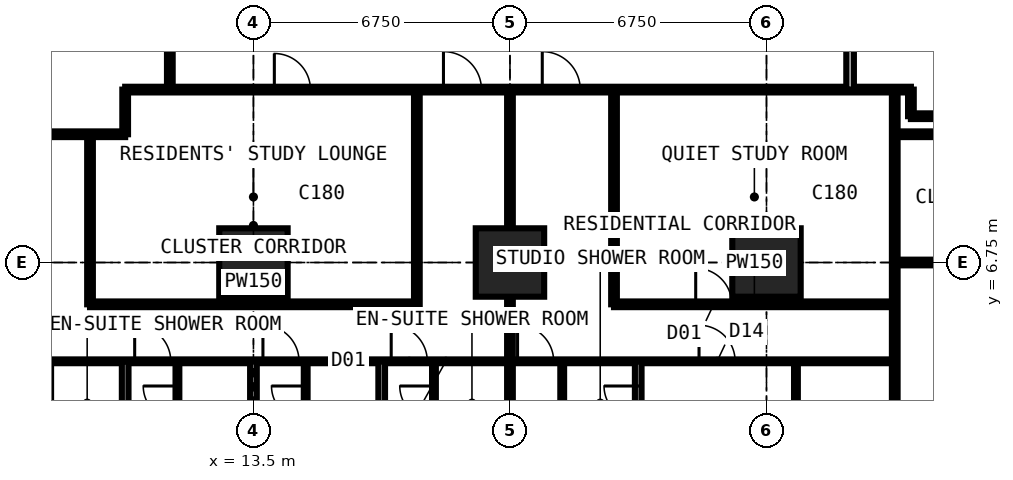
"""IFC4 building model, lengths in metres.
Left out: names, types, materials, properties, quantities, classifications, styles, units other than length and angle.
Written with IfcOpenShell. Run it as: python <this file> out.ifc"""

import sys

from ifc_helpers import new_model, si_unit, direction, frame, frame_2d, origin, origin_2d, place, context, subcontext, project, spatial, rectangle, extrude, element, fill, save


model = new_model("IFC4")
c1 = context("Model", 3, precision=1e-05, world=origin(), true_north=direction((0.0, 1.0)))
c2 = subcontext(c1, "Body", "Model", "MODEL_VIEW")
j1 = project(units=[si_unit("LENGTHUNIT", "METRE"), si_unit("PLANEANGLEUNIT", "RADIAN")], contexts=[c1])
p1 = place(None, origin())
s1 = spatial("IfcSite", under=j1, at=p1, CompositionType="ELEMENT")
p2 = place(p1, origin())
s2 = spatial("IfcBuilding", under=s1, at=p2, CompositionType="ELEMENT")
p3 = place(p2, frame((0.0, 0.0, 68.4)))
s3 = spatial("IfcBuildingStorey", under=s2, at=p3, CompositionType="ELEMENT", Elevation=68.4)
for number, where, z_axis, x_axis in (
    (1, (13.5, 6.75, 0.0), (0.0, 0.0, 1.0), (1.0, 0.0, 0.0)),
    (2, (20.25, 6.75, 0.0), (0.0, 0.0, 1.0), (1.0, 0.0, 0.0)),
    (3, (27.0, 6.75, 0.0), (0.0, 0.0, 1.0), (1.0, 0.0, 0.0)),
):
    element("IfcColumn", number, at=place(p3, frame(where, z_axis=z_axis, x_axis=x_axis)), inside=s3, PredefinedType="COLUMN", context=c2, shape_type="SweptSolid", body=[
        extrude(rectangle(XDim=1.8, YDim=1.8, at=origin_2d()), origin(), (0.0, 0.0, 1.0), 3.6),
    ])
p4 = place(p3, frame((-0.734, 10.125, 0.0), z_axis=(0.0, 0.0, 1.0), x_axis=(1.0, 0.0, 0.0)))
e4 = element("IfcWall", 4, at=p4, inside=s3, PredefinedType="PARTITIONING", context=c2, shape_type="SweptSolid", body=[
    extrude(rectangle(XDim=10.859, YDim=0.15, at=frame_2d((5.429, 0.0))), origin(), (0.0, 0.0, 1.0), 3.375),
])
p5 = place(p4, frame((5.134, 0.0, 0.0)))
e5 = element("IfcOpeningElement", 5, at=p5, cuts=e4, PredefinedType="OPENING", context=c2, shape_type="SweptSolid", body=[
    extrude(rectangle(XDim=1.0, YDim=2.2, at=frame_2d((0.5, 1.1))), frame((0.0, 0.085, 0.0), z_axis=(0.0, -1.0, 0.0), x_axis=(1.0, 0.0, 0.0)), (0.0, 0.0, 1.0), 0.17),
])
p6 = place(p3, frame((6.75, 4.15, 0.0), z_axis=(0.0, 0.0, 1.0), x_axis=(1.0, 0.0, 0.0)))
e6 = element("IfcWall", 6, at=p6, inside=s3, PredefinedType="PARTITIONING", context=c2, shape_type="SweptSolid", body=[
    extrude(rectangle(XDim=23.625, YDim=0.1, at=frame_2d((11.812, 0.0))), origin(), (0.0, 0.0, 1.0), 3.375),
])
p7 = place(p6, frame((0.2, 0.0, 0.0)))
e7 = element("IfcOpeningElement", 7, at=p7, cuts=e6, PredefinedType="OPENING", context=c2, shape_type="SweptSolid", body=[
    extrude(rectangle(XDim=0.95, YDim=2.2, at=frame_2d((0.475, 1.1))), frame((0.0, 0.06, 0.0), z_axis=(0.0, -1.0, 0.0), x_axis=(1.0, 0.0, 0.0)), (0.0, 0.0, 1.0), 0.12),
])
p8 = place(p6, frame((3.625, 0.0, 0.0)))
e8 = element("IfcOpeningElement", 8, at=p8, cuts=e6, PredefinedType="OPENING", context=c2, shape_type="SweptSolid", body=[
    extrude(rectangle(XDim=0.95, YDim=2.2, at=frame_2d((0.475, 1.1))), frame((0.0, 0.06, 0.0), z_axis=(0.0, -1.0, 0.0), x_axis=(1.0, 0.0, 0.0)), (0.0, 0.0, 1.0), 0.12),
])
p9 = place(p6, frame((7.0, 0.0, 0.0)))
e9 = element("IfcOpeningElement", 9, at=p9, cuts=e6, PredefinedType="OPENING", context=c2, shape_type="SweptSolid", body=[
    extrude(rectangle(XDim=0.95, YDim=2.2, at=frame_2d((0.475, 1.1))), frame((0.0, 0.06, 0.0), z_axis=(0.0, -1.0, 0.0), x_axis=(1.0, 0.0, 0.0)), (0.0, 0.0, 1.0), 0.12),
])
p10 = place(p6, frame((10.375, 0.0, 0.0)))
e10 = element("IfcOpeningElement", 10, at=p10, cuts=e6, PredefinedType="OPENING", context=c2, shape_type="SweptSolid", body=[
    extrude(rectangle(XDim=0.95, YDim=2.2, at=frame_2d((0.475, 1.1))), frame((0.0, 0.06, 0.0), z_axis=(0.0, -1.0, 0.0), x_axis=(1.0, 0.0, 0.0)), (0.0, 0.0, 1.0), 0.12),
])
p11 = place(p6, frame((18.475, 0.0, 0.0)))
e11 = element("IfcOpeningElement", 11, at=p11, cuts=e6, PredefinedType="OPENING", context=c2, shape_type="SweptSolid", body=[
    extrude(rectangle(XDim=0.95, YDim=2.2, at=frame_2d((0.475, 1.1))), frame((0.0, 0.06, 0.0), z_axis=(0.0, -1.0, 0.0), x_axis=(1.0, 0.0, 0.0)), (0.0, 0.0, 1.0), 0.12),
])
p12 = place(p6, frame((13.7, 0.0, 0.0)))
e12 = element("IfcOpeningElement", 12, at=p12, cuts=e6, PredefinedType="OPENING", context=c2, shape_type="SweptSolid", body=[
    extrude(rectangle(XDim=0.95, YDim=2.2, at=frame_2d((0.475, 1.1))), frame((0.0, 0.06, 0.0), z_axis=(0.0, -1.0, 0.0), x_axis=(1.0, 0.0, 0.0)), (0.0, 0.0, 1.0), 0.12),
])
p13 = place(p3, frame((9.2, 5.65, 0.0), z_axis=(0.0, 0.0, 1.0), x_axis=(0.0, 1.0, 0.0)))
e13 = element("IfcWall", 13, at=p13, inside=s3, PredefinedType="PARTITIONING", context=c2, shape_type="SweptSolid", body=[
    extrude(rectangle(XDim=4.475, YDim=0.15, at=frame_2d((2.238, 0.0))), origin(), (0.0, 0.0, 1.0), 3.375),
])
p14 = place(p3, frame((9.2, 5.65, 0.0), z_axis=(0.0, 0.0, 1.0), x_axis=(1.0, 0.0, 0.0)))
e14 = element("IfcWall", 14, at=p14, inside=s3, PredefinedType="PARTITIONING", context=c2, shape_type="SweptSolid", body=[
    extrude(rectangle(XDim=8.6, YDim=0.15, at=frame_2d((4.3, 0.0))), origin(), (0.0, 0.0, 1.0), 3.375),
])
p15 = place(p3, frame((10.125, -0.734, 0.0), z_axis=(0.0, 0.0, 1.0), x_axis=(0.0, 1.0, 0.0)))
e15 = element("IfcWall", 15, at=p15, inside=s3, PredefinedType="PARTITIONING", context=c2, shape_type="SweptSolid", body=[
    extrude(rectangle(XDim=4.884, YDim=0.175, at=frame_2d((2.442, 0.0))), origin(), (0.0, 0.0, 1.0), 3.375),
])
p16 = place(p3, frame((10.125, 10.125, 0.0), z_axis=(0.0, 0.0, 1.0), x_axis=(0.0, 1.0, 0.0)))
e16 = element("IfcWall", 16, at=p16, inside=s3, PredefinedType="PARTITIONING", context=c2, shape_type="SweptSolid", body=[
    extrude(rectangle(XDim=1.175, YDim=0.15, at=frame_2d((0.587, 0.0))), origin(), (0.0, 0.0, 1.0), 3.375),
])
p17 = place(p3, frame((10.125, 11.3, 0.0), z_axis=(0.0, 0.0, 1.0), x_axis=(1.0, 0.0, 0.0)))
e17 = element("IfcWall", 17, at=p17, inside=s3, PredefinedType="PARTITIONING", context=c2, shape_type="SweptSolid", body=[
    extrude(rectangle(XDim=20.675, YDim=0.15, at=frame_2d((10.337, 0.0))), origin(), (0.0, 0.0, 1.0), 3.375),
])
p18 = place(p17, frame((8.375, 0.0, 0.0)))
e18 = element("IfcOpeningElement", 18, at=p18, cuts=e17, PredefinedType="OPENING", context=c2, shape_type="SweptSolid", body=[
    extrude(rectangle(XDim=1.0, YDim=2.2, at=frame_2d((0.5, 1.1))), frame((0.0, 0.085, 0.0), z_axis=(0.0, -1.0, 0.0), x_axis=(1.0, 0.0, 0.0)), (0.0, 0.0, 1.0), 0.17),
])
p19 = place(p17, frame((10.975, 0.0, 0.0)))
e19 = element("IfcOpeningElement", 19, at=p19, cuts=e17, PredefinedType="OPENING", context=c2, shape_type="SweptSolid", body=[
    extrude(rectangle(XDim=1.0, YDim=2.2, at=frame_2d((0.5, 1.1))), frame((0.0, 0.085, 0.0), z_axis=(0.0, -1.0, 0.0), x_axis=(1.0, 0.0, 0.0)), (0.0, 0.0, 1.0), 0.17),
])
p20 = place(p17, frame((3.925, 0.0, 0.0)))
e20 = element("IfcOpeningElement", 20, at=p20, cuts=e17, PredefinedType="OPENING", context=c2, shape_type="SweptSolid", body=[
    extrude(rectangle(XDim=0.95, YDim=2.2, at=frame_2d((0.475, 1.1))), frame((0.0, 0.085, 0.0), z_axis=(0.0, -1.0, 0.0), x_axis=(1.0, 0.0, 0.0)), (0.0, 0.0, 1.0), 0.17),
])
p21 = place(p3, frame((11.3, 11.3, 0.0), z_axis=(0.0, 0.0, 1.0), x_axis=(0.0, 1.0, 0.0)))
e21 = element("IfcWall", 21, at=p21, inside=s3, PredefinedType="PARTITIONING", context=c2, shape_type="SweptSolid", body=[
    extrude(rectangle(XDim=19.075, YDim=0.15, at=frame_2d((9.538, 0.0))), origin(), (0.0, 0.0, 1.0), 3.375),
])
p22 = place(p21, frame((12.875, 0.0, 0.0)))
e22 = element("IfcOpeningElement", 22, at=p22, cuts=e21, PredefinedType="OPENING", context=c2, shape_type="SweptSolid", body=[
    extrude(rectangle(XDim=1.0, YDim=2.2, at=frame_2d((0.5, 1.1))), frame((0.0, 0.085, 0.0), z_axis=(0.0, -1.0, 0.0), x_axis=(1.0, 0.0, 0.0)), (0.0, 0.0, 1.0), 0.17),
])
p23 = place(p21, frame((10.438, 0.0, 0.0)))
e23 = element("IfcOpeningElement", 23, at=p23, cuts=e21, PredefinedType="OPENING", context=c2, shape_type="SweptSolid", body=[
    extrude(rectangle(XDim=1.0, YDim=2.2, at=frame_2d((0.5, 1.1))), frame((0.0, 0.085, 0.0), z_axis=(0.0, -1.0, 0.0), x_axis=(1.0, 0.0, 0.0)), (0.0, 0.0, 1.0), 0.17),
])
p24 = place(p21, frame((15.675, 0.0, 0.0)))
e24 = element("IfcOpeningElement", 24, at=p24, cuts=e21, PredefinedType="OPENING", context=c2, shape_type="SweptSolid", body=[
    extrude(rectangle(XDim=0.95, YDim=2.2, at=frame_2d((0.475, 1.1))), frame((0.0, 0.085, 0.0), z_axis=(0.0, -1.0, 0.0), x_axis=(1.0, 0.0, 0.0)), (0.0, 0.0, 1.0), 0.17),
])
p25 = place(p3, frame((11.5, 1.95, 0.0), z_axis=(0.0, 0.0, 1.0), x_axis=(0.0, 1.0, 0.0)))
e25 = element("IfcWall", 25, at=p25, inside=s3, PredefinedType="PARTITIONING", context=c2, shape_type="SweptSolid", body=[
    extrude(rectangle(XDim=2.2, YDim=0.1, at=frame_2d((1.1, 0.0))), origin(), (0.0, 0.0, 1.0), 3.375),
])
p26 = place(p25, frame((0.65, 0.0, 0.0)))
e26 = element("IfcOpeningElement", 26, at=p26, cuts=e25, PredefinedType="OPENING", context=c2, shape_type="SweptSolid", body=[
    extrude(rectangle(XDim=0.9, YDim=2.2, at=frame_2d((0.45, 1.1))), frame((0.0, 0.06, 0.0), z_axis=(0.0, -1.0, 0.0), x_axis=(1.0, 0.0, 0.0)), (0.0, 0.0, 1.0), 0.12),
])
p27 = place(p3, frame((13.5, -0.734, 0.0), z_axis=(0.0, 0.0, 1.0), x_axis=(0.0, 1.0, 0.0)))
e27 = element("IfcWall", 27, at=p27, inside=s3, PredefinedType="PARTITIONING", context=c2, shape_type="SweptSolid", body=[
    extrude(rectangle(XDim=4.884, YDim=0.175, at=frame_2d((2.442, 0.0))), origin(), (0.0, 0.0, 1.0), 2.877),
])
p28 = place(p3, frame((14.875, 1.95, 0.0), z_axis=(0.0, 0.0, 1.0), x_axis=(0.0, 1.0, 0.0)))
e28 = element("IfcWall", 28, at=p28, inside=s3, PredefinedType="PARTITIONING", context=c2, shape_type="SweptSolid", body=[
    extrude(rectangle(XDim=2.2, YDim=0.1, at=frame_2d((1.1, 0.0))), origin(), (0.0, 0.0, 1.0), 3.375),
])
p29 = place(p28, frame((0.65, 0.0, 0.0)))
e29 = element("IfcOpeningElement", 29, at=p29, cuts=e28, PredefinedType="OPENING", context=c2, shape_type="SweptSolid", body=[
    extrude(rectangle(XDim=0.9, YDim=2.2, at=frame_2d((0.45, 1.1))), frame((0.0, 0.06, 0.0), z_axis=(0.0, -1.0, 0.0), x_axis=(1.0, 0.0, 0.0)), (0.0, 0.0, 1.0), 0.12),
])
p30 = place(p3, frame((16.875, -0.734, 0.0), z_axis=(0.0, 0.0, 1.0), x_axis=(0.0, 1.0, 0.0)))
e30 = element("IfcWall", 30, at=p30, inside=s3, PredefinedType="PARTITIONING", context=c2, shape_type="SweptSolid", body=[
    extrude(rectangle(XDim=4.884, YDim=0.175, at=frame_2d((2.442, 0.0))), origin(), (0.0, 0.0, 1.0), 3.375),
])
p31 = place(p3, frame((17.8, 5.65, 0.0), z_axis=(0.0, 0.0, 1.0), x_axis=(0.0, 1.0, 0.0)))
e31 = element("IfcWall", 31, at=p31, inside=s3, PredefinedType="PARTITIONING", context=c2, shape_type="SweptSolid", body=[
    extrude(rectangle(XDim=5.65, YDim=0.15, at=frame_2d((2.825, 0.0))), origin(), (0.0, 0.0, 1.0), 3.375),
])
p32 = place(p3, frame((18.25, 1.95, 0.0), z_axis=(0.0, 0.0, 1.0), x_axis=(0.0, 1.0, 0.0)))
e32 = element("IfcWall", 32, at=p32, inside=s3, PredefinedType="PARTITIONING", context=c2, shape_type="SweptSolid", body=[
    extrude(rectangle(XDim=2.2, YDim=0.1, at=frame_2d((1.1, 0.0))), origin(), (0.0, 0.0, 1.0), 3.375),
])
p33 = place(p32, frame((0.65, 0.0, 0.0)))
e33 = element("IfcOpeningElement", 33, at=p33, cuts=e32, PredefinedType="OPENING", context=c2, shape_type="SweptSolid", body=[
    extrude(rectangle(XDim=0.9, YDim=2.2, at=frame_2d((0.45, 1.1))), frame((0.0, 0.06, 0.0), z_axis=(0.0, -1.0, 0.0), x_axis=(1.0, 0.0, 0.0)), (0.0, 0.0, 1.0), 0.12),
])
p34 = place(p3, frame((20.25, -0.734, 0.0), z_axis=(0.0, 0.0, 1.0), x_axis=(0.0, 1.0, 0.0)))
e34 = element("IfcWall", 34, at=p34, inside=s3, PredefinedType="PARTITIONING", context=c2, shape_type="SweptSolid", body=[
    extrude(rectangle(XDim=12.034, YDim=0.15, at=frame_2d((6.017, 0.0))), origin(), (0.0, 0.0, 1.0), 2.61),
])
p35 = place(p3, frame((21.625, 1.95, 0.0), z_axis=(0.0, 0.0, 1.0), x_axis=(0.0, 1.0, 0.0)))
e35 = element("IfcWall", 35, at=p35, inside=s3, PredefinedType="PARTITIONING", context=c2, shape_type="SweptSolid", body=[
    extrude(rectangle(XDim=2.2, YDim=0.1, at=frame_2d((1.1, 0.0))), origin(), (0.0, 0.0, 1.0), 3.375),
])
p36 = place(p3, frame((22.988, 5.65, 0.0), z_axis=(0.0, 0.0, 1.0), x_axis=(1.0, 0.0, 0.0)))
e36 = element("IfcWall", 36, at=p36, inside=s3, PredefinedType="PARTITIONING", context=c2, shape_type="SweptSolid", body=[
    extrude(rectangle(XDim=7.387, YDim=0.15, at=frame_2d((3.694, 0.0))), origin(), (0.0, 0.0, 1.0), 3.375),
])
p37 = place(p36, frame((2.15, 0.0, 0.0)))
e37 = element("IfcOpeningElement", 37, at=p37, cuts=e36, PredefinedType="OPENING", context=c2, shape_type="SweptSolid", body=[
    extrude(rectangle(XDim=0.95, YDim=2.2, at=frame_2d((0.475, 1.1))), frame((0.0, 0.085, 0.0), z_axis=(0.0, -1.0, 0.0), x_axis=(1.0, 0.0, 0.0)), (0.0, 0.0, 1.0), 0.17),
])
p38 = place(p3, frame((22.988, 5.65, 0.0), z_axis=(0.0, 0.0, 1.0), x_axis=(0.0, 1.0, 0.0)))
e38 = element("IfcWall", 38, at=p38, inside=s3, PredefinedType="PARTITIONING", context=c2, shape_type="SweptSolid", body=[
    extrude(rectangle(XDim=5.65, YDim=0.15, at=frame_2d((2.825, 0.0))), origin(), (0.0, 0.0, 1.0), 3.375),
])
p39 = place(p3, frame((23.625, -0.734, 0.0), z_axis=(0.0, 0.0, 1.0), x_axis=(0.0, 1.0, 0.0)))
e39 = element("IfcWall", 39, at=p39, inside=s3, PredefinedType="PARTITIONING", context=c2, shape_type="SweptSolid", body=[
    extrude(rectangle(XDim=4.884, YDim=0.175, at=frame_2d((2.442, 0.0))), origin(), (0.0, 0.0, 1.0), 3.375),
])
p40 = place(p39, frame((3.334, 0.0, 0.0)))
e40 = element("IfcOpeningElement", 40, at=p40, cuts=e39, PredefinedType="OPENING", context=c2, shape_type="SweptSolid", body=[
    extrude(rectangle(XDim=0.9, YDim=2.2, at=frame_2d((0.45, 1.1))), frame((0.0, 0.097, 0.0), z_axis=(0.0, -1.0, 0.0), x_axis=(1.0, 0.0, 0.0)), (0.0, 0.0, 1.0), 0.195),
])
p41 = place(p3, frame((27.775, 1.75, 0.0), z_axis=(0.0, 0.0, 1.0), x_axis=(0.0, 1.0, 0.0)))
e41 = element("IfcWall", 41, at=p41, inside=s3, PredefinedType="PARTITIONING", context=c2, shape_type="SweptSolid", body=[
    extrude(rectangle(XDim=2.4, YDim=0.1, at=frame_2d((1.2, 0.0))), origin(), (0.0, 0.0, 1.0), 3.375),
])
p42 = place(p3, frame((29.2, 11.3, 0.0), z_axis=(0.0, 0.0, 1.0), x_axis=(0.0, 1.0, 0.0)))
e42 = element("IfcWall", 42, at=p42, inside=s3, PredefinedType="PARTITIONING", context=c2, shape_type="SweptSolid", body=[
    extrude(rectangle(XDim=17.9, YDim=0.2, at=frame_2d((8.95, 0.0))), origin(), (0.0, 0.0, 1.0), 3.375),
])
p43 = place(p42, frame((8.35, 0.0, 0.0)))
e43 = element("IfcOpeningElement", 43, at=p43, cuts=e42, PredefinedType="OPENING", context=c2, shape_type="SweptSolid", body=[
    extrude(rectangle(XDim=1.2, YDim=2.2, at=frame_2d((0.6, 1.1))), frame((0.0, 0.11, 0.0), z_axis=(0.0, -1.0, 0.0), x_axis=(1.0, 0.0, 0.0)), (0.0, 0.0, 1.0), 0.22),
])
p44 = place(p3, frame((30.375, -0.734, 0.0), z_axis=(0.0, 0.0, 1.0), x_axis=(0.0, 1.0, 0.0)))
e44 = element("IfcWall", 44, at=p44, inside=s3, PredefinedType="PARTITIONING", context=c2, shape_type="SweptSolid", body=[
    extrude(rectangle(XDim=12.034, YDim=0.15, at=frame_2d((6.017, 0.0))), origin(), (0.0, 0.0, 1.0), 3.375),
])
p45 = place(p3, frame((30.375, 6.75, 0.0), z_axis=(0.0, 0.0, 1.0), x_axis=(1.0, 0.0, 0.0)))
e45 = element("IfcWall", 45, at=p45, inside=s3, PredefinedType="PARTITIONING", context=c2, shape_type="SweptSolid", body=[
    extrude(rectangle(XDim=10.859, YDim=0.15, at=frame_2d((5.429, 0.0))), origin(), (0.0, 0.0, 1.0), 2.877),
])
p46 = place(p45, frame((1.45, 0.0, 0.0)))
e46 = element("IfcOpeningElement", 46, at=p46, cuts=e45, PredefinedType="OPENING", context=c2, shape_type="SweptSolid", body=[
    extrude(rectangle(XDim=1.0, YDim=2.2, at=frame_2d((0.5, 1.1))), frame((0.0, 0.085, 0.0), z_axis=(0.0, -1.0, 0.0), x_axis=(1.0, 0.0, 0.0)), (0.0, 0.0, 1.0), 0.17),
])
p47 = place(p3, frame((30.375, 10.125, 0.0), z_axis=(0.0, 0.0, 1.0), x_axis=(1.0, 0.0, 0.0)))
e47 = element("IfcWall", 47, at=p47, inside=s3, PredefinedType="PARTITIONING", context=c2, shape_type="SweptSolid", body=[
    extrude(rectangle(XDim=10.859, YDim=0.15, at=frame_2d((5.429, 0.0))), origin(), (0.0, 0.0, 1.0), 3.375),
])
p48 = place(p47, frame((2.5, 0.0, 0.0)))
e48 = element("IfcOpeningElement", 48, at=p48, cuts=e47, PredefinedType="OPENING", context=c2, shape_type="SweptSolid", body=[
    extrude(rectangle(XDim=1.0, YDim=2.2, at=frame_2d((0.5, 1.1))), frame((0.0, 0.085, 0.0), z_axis=(0.0, -1.0, 0.0), x_axis=(1.0, 0.0, 0.0)), (0.0, 0.0, 1.0), 0.17),
])
p49 = place(p3, frame((30.8, 10.6, 0.0), z_axis=(0.0, 0.0, 1.0), x_axis=(0.0, 1.0, 0.0)))
e49 = element("IfcWall", 49, at=p49, inside=s3, PredefinedType="PARTITIONING", context=c2, shape_type="SweptSolid", body=[
    extrude(rectangle(XDim=0.7, YDim=0.15, at=frame_2d((0.35, 0.0))), origin(), (0.0, 0.0, 1.0), 3.375),
])
p50 = place(p3, frame((30.8, 10.6, 0.0), z_axis=(0.0, 0.0, 1.0), x_axis=(1.0, 0.0, 0.0)))
e50 = element("IfcWall", 50, at=p50, inside=s3, PredefinedType="PARTITIONING", context=c2, shape_type="SweptSolid", body=[
    extrude(rectangle(XDim=1.85, YDim=0.15, at=frame_2d((0.925, 0.0))), origin(), (0.0, 0.0, 1.0), 3.375),
])
p51 = place(p8, origin())
e51 = element("IfcDoor", 51, at=p51, inside=s3, OperationType="SINGLE_SWING_LEFT", PredefinedType="DOOR", context=c2, shape_type="SweptSolid", body=[
    extrude(rectangle(XDim=0.95, YDim=2.2, at=frame_2d((0.475, 1.1))), frame((0.0, 0.025, 0.0), z_axis=(0.0, -1.0, 0.0), x_axis=(1.0, 0.0, 0.0)), (0.0, 0.0, 1.0), 0.05),
])
fill(e8, e51)
p52 = place(p26, origin())
e52 = element("IfcDoor", 52, at=p52, inside=s3, OperationType="SINGLE_SWING_RIGHT", PredefinedType="DOOR", context=c2, shape_type="SweptSolid", body=[
    extrude(rectangle(XDim=0.9, YDim=2.2, at=frame_2d((0.45, 1.1))), frame((0.0, 0.025, 0.0), z_axis=(0.0, -1.0, 0.0), x_axis=(1.0, 0.0, 0.0)), (0.0, 0.0, 1.0), 0.05),
])
fill(e26, e52)
p53 = place(p9, origin())
e53 = element("IfcDoor", 53, at=p53, inside=s3, OperationType="SINGLE_SWING_LEFT", PredefinedType="DOOR", context=c2, shape_type="SweptSolid", body=[
    extrude(rectangle(XDim=0.95, YDim=2.2, at=frame_2d((0.475, 1.1))), frame((0.0, 0.025, 0.0), z_axis=(0.0, -1.0, 0.0), x_axis=(1.0, 0.0, 0.0)), (0.0, 0.0, 1.0), 0.05),
])
fill(e9, e53)
p54 = place(p29, origin())
e54 = element("IfcDoor", 54, at=p54, inside=s3, OperationType="SINGLE_SWING_RIGHT", PredefinedType="DOOR", context=c2, shape_type="SweptSolid", body=[
    extrude(rectangle(XDim=0.9, YDim=2.2, at=frame_2d((0.45, 1.1))), frame((0.0, 0.025, 0.0), z_axis=(0.0, -1.0, 0.0), x_axis=(1.0, 0.0, 0.0)), (0.0, 0.0, 1.0), 0.05),
])
fill(e29, e54)
p55 = place(p10, origin())
e55 = element("IfcDoor", 55, at=p55, inside=s3, OperationType="SINGLE_SWING_LEFT", PredefinedType="DOOR", context=c2, shape_type="SweptSolid", body=[
    extrude(rectangle(XDim=0.95, YDim=2.2, at=frame_2d((0.475, 1.1))), frame((0.0, 0.025, 0.0), z_axis=(0.0, -1.0, 0.0), x_axis=(1.0, 0.0, 0.0)), (0.0, 0.0, 1.0), 0.05),
])
fill(e10, e55)
p56 = place(p33, origin())
e56 = element("IfcDoor", 56, at=p56, inside=s3, OperationType="SINGLE_SWING_RIGHT", PredefinedType="DOOR", context=c2, shape_type="SweptSolid", body=[
    extrude(rectangle(XDim=0.9, YDim=2.2, at=frame_2d((0.45, 1.1))), frame((0.0, 0.025, 0.0), z_axis=(0.0, -1.0, 0.0), x_axis=(1.0, 0.0, 0.0)), (0.0, 0.0, 1.0), 0.05),
])
fill(e33, e56)
p57 = place(p18, origin())
e57 = element("IfcDoor", 57, at=p57, inside=s3, OperationType="SINGLE_SWING_LEFT", PredefinedType="DOOR", context=c2, shape_type="SweptSolid", body=[
    extrude(rectangle(XDim=1.0, YDim=2.2, at=frame_2d((0.5, 1.1))), frame((0.0, 0.025, 0.0), z_axis=(0.0, -1.0, 0.0), x_axis=(1.0, 0.0, 0.0)), (0.0, 0.0, 1.0), 0.05),
])
fill(e18, e57)
p58 = place(p11, origin())
e58 = element("IfcDoor", 58, at=p58, inside=s3, OperationType="SINGLE_SWING_LEFT", PredefinedType="DOOR", context=c2, shape_type="SweptSolid", body=[
    extrude(rectangle(XDim=0.95, YDim=2.2, at=frame_2d((0.475, 1.1))), frame((0.0, 0.025, 0.0), z_axis=(0.0, -1.0, 0.0), x_axis=(1.0, 0.0, 0.0)), (0.0, 0.0, 1.0), 0.05),
])
fill(e11, e58)
p59 = place(p12, origin())
e59 = element("IfcDoor", 59, at=p59, inside=s3, OperationType="SINGLE_SWING_LEFT", PredefinedType="DOOR", context=c2, shape_type="SweptSolid", body=[
    extrude(rectangle(XDim=0.95, YDim=2.2, at=frame_2d((0.475, 1.1))), frame((0.0, 0.025, 0.0), z_axis=(0.0, -1.0, 0.0), x_axis=(1.0, 0.0, 0.0)), (0.0, 0.0, 1.0), 0.05),
])
fill(e12, e59)
p60 = place(p40, origin())
e60 = element("IfcDoor", 60, at=p60, inside=s3, OperationType="SINGLE_SWING_RIGHT", PredefinedType="DOOR", context=c2, shape_type="SweptSolid", body=[
    extrude(rectangle(XDim=0.9, YDim=2.2, at=frame_2d((0.45, 1.1))), frame((0.0, 0.025, 0.0), z_axis=(0.0, -1.0, 0.0), x_axis=(1.0, 0.0, 0.0)), (0.0, 0.0, 1.0), 0.05),
])
fill(e40, e60)
p61 = place(p19, origin())
e61 = element("IfcDoor", 61, at=p61, inside=s3, OperationType="SINGLE_SWING_LEFT", PredefinedType="DOOR", context=c2, shape_type="SweptSolid", body=[
    extrude(rectangle(XDim=1.0, YDim=2.2, at=frame_2d((0.5, 1.1))), frame((0.0, 0.025, 0.0), z_axis=(0.0, -1.0, 0.0), x_axis=(1.0, 0.0, 0.0)), (0.0, 0.0, 1.0), 0.05),
])
fill(e19, e61)
p62 = place(p20, origin())
e62 = element("IfcDoor", 62, at=p62, inside=s3, OperationType="SINGLE_SWING_LEFT", PredefinedType="DOOR", context=c2, shape_type="SweptSolid", body=[
    extrude(rectangle(XDim=0.95, YDim=2.2, at=frame_2d((0.475, 1.1))), frame((0.0, 0.025, 0.0), z_axis=(0.0, -1.0, 0.0), x_axis=(1.0, 0.0, 0.0)), (0.0, 0.0, 1.0), 0.05),
])
fill(e20, e62)
p63 = place(p37, origin())
e63 = element("IfcDoor", 63, at=p63, inside=s3, OperationType="SINGLE_SWING_LEFT", PredefinedType="DOOR", context=c2, shape_type="SweptSolid", body=[
    extrude(rectangle(XDim=0.95, YDim=2.2, at=frame_2d((0.475, 1.1))), frame((0.0, 0.025, 0.0), z_axis=(0.0, -1.0, 0.0), x_axis=(1.0, 0.0, 0.0)), (0.0, 0.0, 1.0), 0.05),
])
fill(e37, e63)
save(model, sys.argv[1])
